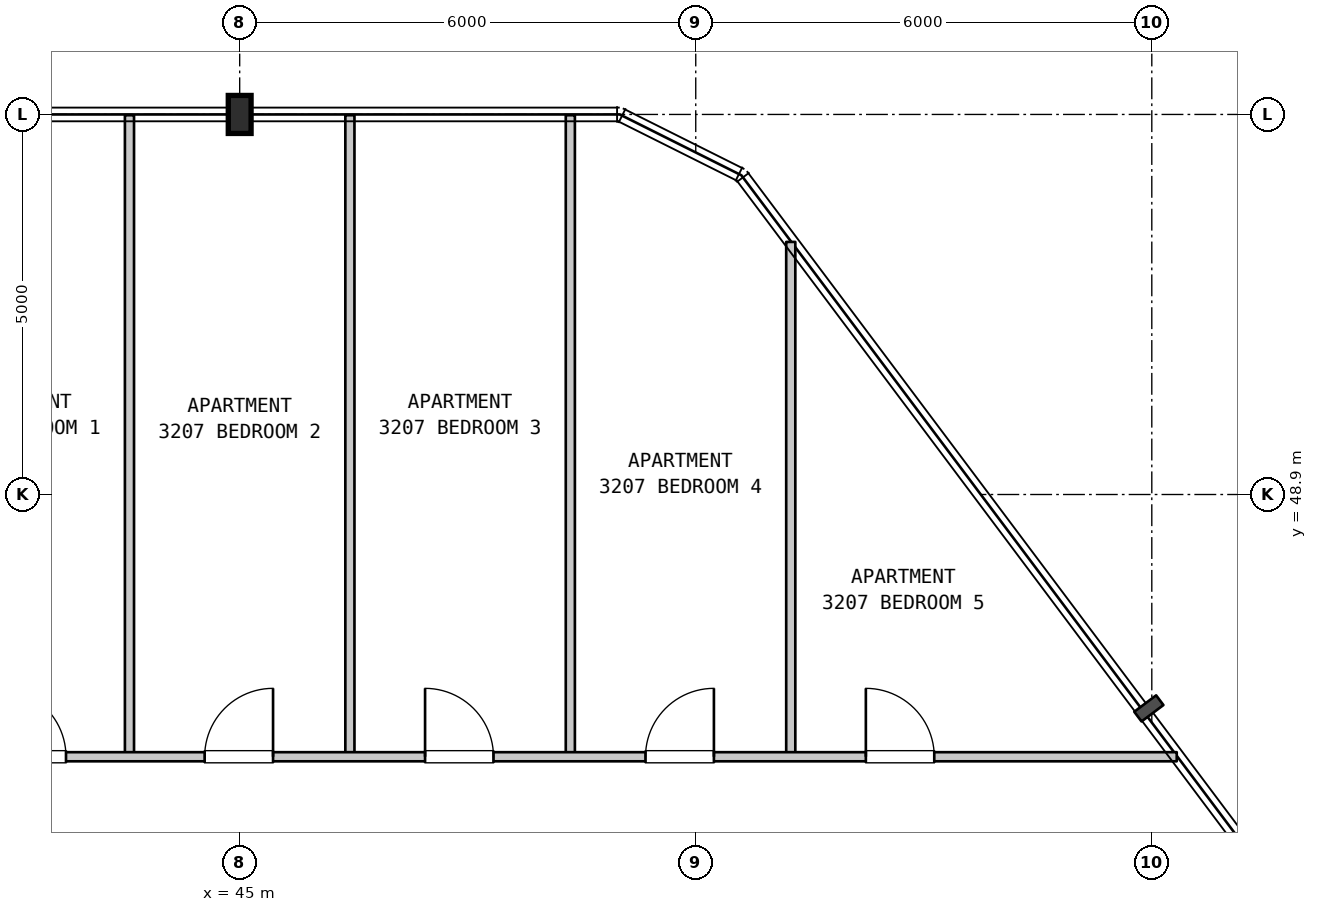
"""IFC4 building model, lengths in metres.
Left out: names, types, materials, properties, quantities, classifications, styles, units other than length and angle.
Written with IfcOpenShell. Run it as: python <this file> out.ifc"""

import sys

from ifc_helpers import new_model, si_unit, direction, frame, frame_2d, origin, origin_2d, place, context, subcontext, project, spatial, rectangle, i_section, extrude, element, fill, save


model = new_model("IFC4")
c1 = context("Model", 3, precision=1e-05, world=origin(), true_north=direction((0.0, 1.0)))
c2 = subcontext(c1, "Body", "Model", "MODEL_VIEW")
j1 = project(units=[si_unit("LENGTHUNIT", "METRE"), si_unit("PLANEANGLEUNIT", "RADIAN")], contexts=[c1])
p1 = place(None, origin())
s1 = spatial("IfcSite", under=j1, at=p1, CompositionType="ELEMENT")
p2 = place(p1, origin())
s2 = spatial("IfcBuilding", under=s1, at=p2, CompositionType="ELEMENT")
p3 = place(p2, frame((0.0, 0.0, 133.5)))
s3 = spatial("IfcBuildingStorey", under=s2, at=p3, CompositionType="ELEMENT", Elevation=133.5)
p4 = place(p3, frame((45.0, 53.9, 0.0), z_axis=(0.0, 0.0, 1.0), x_axis=(1.0, 0.0, 0.0)))
e1 = element("IfcColumn", 1, at=p4, inside=s3, PredefinedType="COLUMN", context=c2, shape_type="SweptSolid", body=[
    extrude(i_section(OverallWidth=0.3, OverallDepth=0.5, WebThickness=0.014, FlangeThickness=0.028, FilletRadius=0.027, at=origin_2d()), origin(), (0.0, 0.0, 1.0), 3.7),
])
for number, where, z_axis, x_axis in (
    (2, (43.55, 45.45, 0.0), (0.0, 0.0, 1.0), (0.0, 1.0, 0.0)),
    (3, (46.45, 45.45, 0.0), (0.0, 0.0, 1.0), (0.0, 1.0, 0.0)),
    (4, (49.35, 45.45, 0.0), (0.0, 0.0, 1.0), (0.0, 1.0, 0.0)),
):
    element("IfcWall", number, at=place(p3, frame(where, z_axis=z_axis, x_axis=x_axis)), inside=s3, PredefinedType="PARTITIONING", context=c2, shape_type="SweptSolid", body=[
        extrude(rectangle(XDim=8.44, YDim=0.12, at=frame_2d((4.22, 0.0))), origin(), (0.0, 0.0, 1.0), 3.385),
    ])
p5 = place(p3, frame((52.25, 45.45, 0.0), z_axis=(0.0, 0.0, 1.0), x_axis=(0.0, 1.0, 0.0)))
e5 = element("IfcWall", 5, at=p5, inside=s3, PredefinedType="PARTITIONING", context=c2, shape_type="SweptSolid", body=[
    extrude(rectangle(XDim=6.773, YDim=0.12, at=frame_2d((3.386, 0.0))), origin(), (0.0, 0.0, 1.0), 3.385),
])
p6 = place(p3, frame((40.685, 45.45, 0.0), z_axis=(0.0, 0.0, 1.0), x_axis=(1.0, 0.0, 0.0)))
e6 = element("IfcWall", 6, at=p6, inside=s3, PredefinedType="PARTITIONING", context=c2, shape_type="SweptSolid", body=[
    extrude(rectangle(XDim=16.643, YDim=0.12, at=frame_2d((8.321, 0.0))), origin(), (0.0, 0.0, 1.0), 3.385),
])
p7 = place(p6, frame((1.13, 0.0, 0.0)))
e7 = element("IfcOpeningElement", 7, at=p7, cuts=e6, PredefinedType="OPENING", context=c2, shape_type="SweptSolid", body=[
    extrude(rectangle(XDim=0.9, YDim=2.15, at=frame_2d((0.45, 1.075))), frame((0.0, 0.07, 0.0), z_axis=(0.0, -1.0, 0.0), x_axis=(1.0, 0.0, 0.0)), (0.0, 0.0, 1.0), 0.14),
])
p8 = place(p6, frame((3.854, 0.0, 0.0)))
e8 = element("IfcOpeningElement", 8, at=p8, cuts=e6, PredefinedType="OPENING", context=c2, shape_type="SweptSolid", body=[
    extrude(rectangle(XDim=0.9, YDim=2.15, at=frame_2d((0.45, 1.075))), frame((0.0, 0.07, 0.0), z_axis=(0.0, -1.0, 0.0), x_axis=(1.0, 0.0, 0.0)), (0.0, 0.0, 1.0), 0.14),
])
p9 = place(p6, frame((6.754, 0.0, 0.0)))
e9 = element("IfcOpeningElement", 9, at=p9, cuts=e6, PredefinedType="OPENING", context=c2, shape_type="SweptSolid", body=[
    extrude(rectangle(XDim=0.9, YDim=2.15, at=frame_2d((0.45, 1.075))), frame((0.0, 0.07, 0.0), z_axis=(0.0, -1.0, 0.0), x_axis=(1.0, 0.0, 0.0)), (0.0, 0.0, 1.0), 0.14),
])
p10 = place(p6, frame((9.654, 0.0, 0.0)))
e10 = element("IfcOpeningElement", 10, at=p10, cuts=e6, PredefinedType="OPENING", context=c2, shape_type="SweptSolid", body=[
    extrude(rectangle(XDim=0.9, YDim=2.15, at=frame_2d((0.45, 1.075))), frame((0.0, 0.07, 0.0), z_axis=(0.0, -1.0, 0.0), x_axis=(1.0, 0.0, 0.0)), (0.0, 0.0, 1.0), 0.14),
])
p11 = place(p6, frame((12.553, 0.0, 0.0)))
e11 = element("IfcOpeningElement", 11, at=p11, cuts=e6, PredefinedType="OPENING", context=c2, shape_type="SweptSolid", body=[
    extrude(rectangle(XDim=0.9, YDim=2.15, at=frame_2d((0.45, 1.075))), frame((0.0, 0.07, 0.0), z_axis=(0.0, -1.0, 0.0), x_axis=(1.0, 0.0, 0.0)), (0.0, 0.0, 1.0), 0.14),
])
p12 = place(p7, origin())
e12 = element("IfcDoor", 12, at=p12, inside=s3, OperationType="SINGLE_SWING_LEFT", PredefinedType="DOOR", context=c2, shape_type="SweptSolid", body=[
    extrude(rectangle(XDim=0.9, YDim=2.15, at=frame_2d((0.45, 1.075))), frame((0.0, 0.025, 0.0), z_axis=(0.0, -1.0, 0.0), x_axis=(1.0, 0.0, 0.0)), (0.0, 0.0, 1.0), 0.05),
])
fill(e7, e12)
p13 = place(p8, origin())
e13 = element("IfcDoor", 13, at=p13, inside=s3, OperationType="SINGLE_SWING_RIGHT", PredefinedType="DOOR", context=c2, shape_type="SweptSolid", body=[
    extrude(rectangle(XDim=0.9, YDim=2.15, at=frame_2d((0.45, 1.075))), frame((0.0, 0.025, 0.0), z_axis=(0.0, -1.0, 0.0), x_axis=(1.0, 0.0, 0.0)), (0.0, 0.0, 1.0), 0.05),
])
fill(e8, e13)
p14 = place(p9, origin())
e14 = element("IfcDoor", 14, at=p14, inside=s3, OperationType="SINGLE_SWING_LEFT", PredefinedType="DOOR", context=c2, shape_type="SweptSolid", body=[
    extrude(rectangle(XDim=0.9, YDim=2.15, at=frame_2d((0.45, 1.075))), frame((0.0, 0.025, 0.0), z_axis=(0.0, -1.0, 0.0), x_axis=(1.0, 0.0, 0.0)), (0.0, 0.0, 1.0), 0.05),
])
fill(e9, e14)
p15 = place(p10, origin())
e15 = element("IfcDoor", 15, at=p15, inside=s3, OperationType="SINGLE_SWING_RIGHT", PredefinedType="DOOR", context=c2, shape_type="SweptSolid", body=[
    extrude(rectangle(XDim=0.9, YDim=2.15, at=frame_2d((0.45, 1.075))), frame((0.0, 0.025, 0.0), z_axis=(0.0, -1.0, 0.0), x_axis=(1.0, 0.0, 0.0)), (0.0, 0.0, 1.0), 0.05),
])
fill(e10, e15)
p16 = place(p11, origin())
e16 = element("IfcDoor", 16, at=p16, inside=s3, OperationType="SINGLE_SWING_LEFT", PredefinedType="DOOR", context=c2, shape_type="SweptSolid", body=[
    extrude(rectangle(XDim=0.9, YDim=2.15, at=frame_2d((0.45, 1.075))), frame((0.0, 0.025, 0.0), z_axis=(0.0, -1.0, 0.0), x_axis=(1.0, 0.0, 0.0)), (0.0, 0.0, 1.0), 0.05),
])
fill(e11, e16)
save(model, sys.argv[1])
